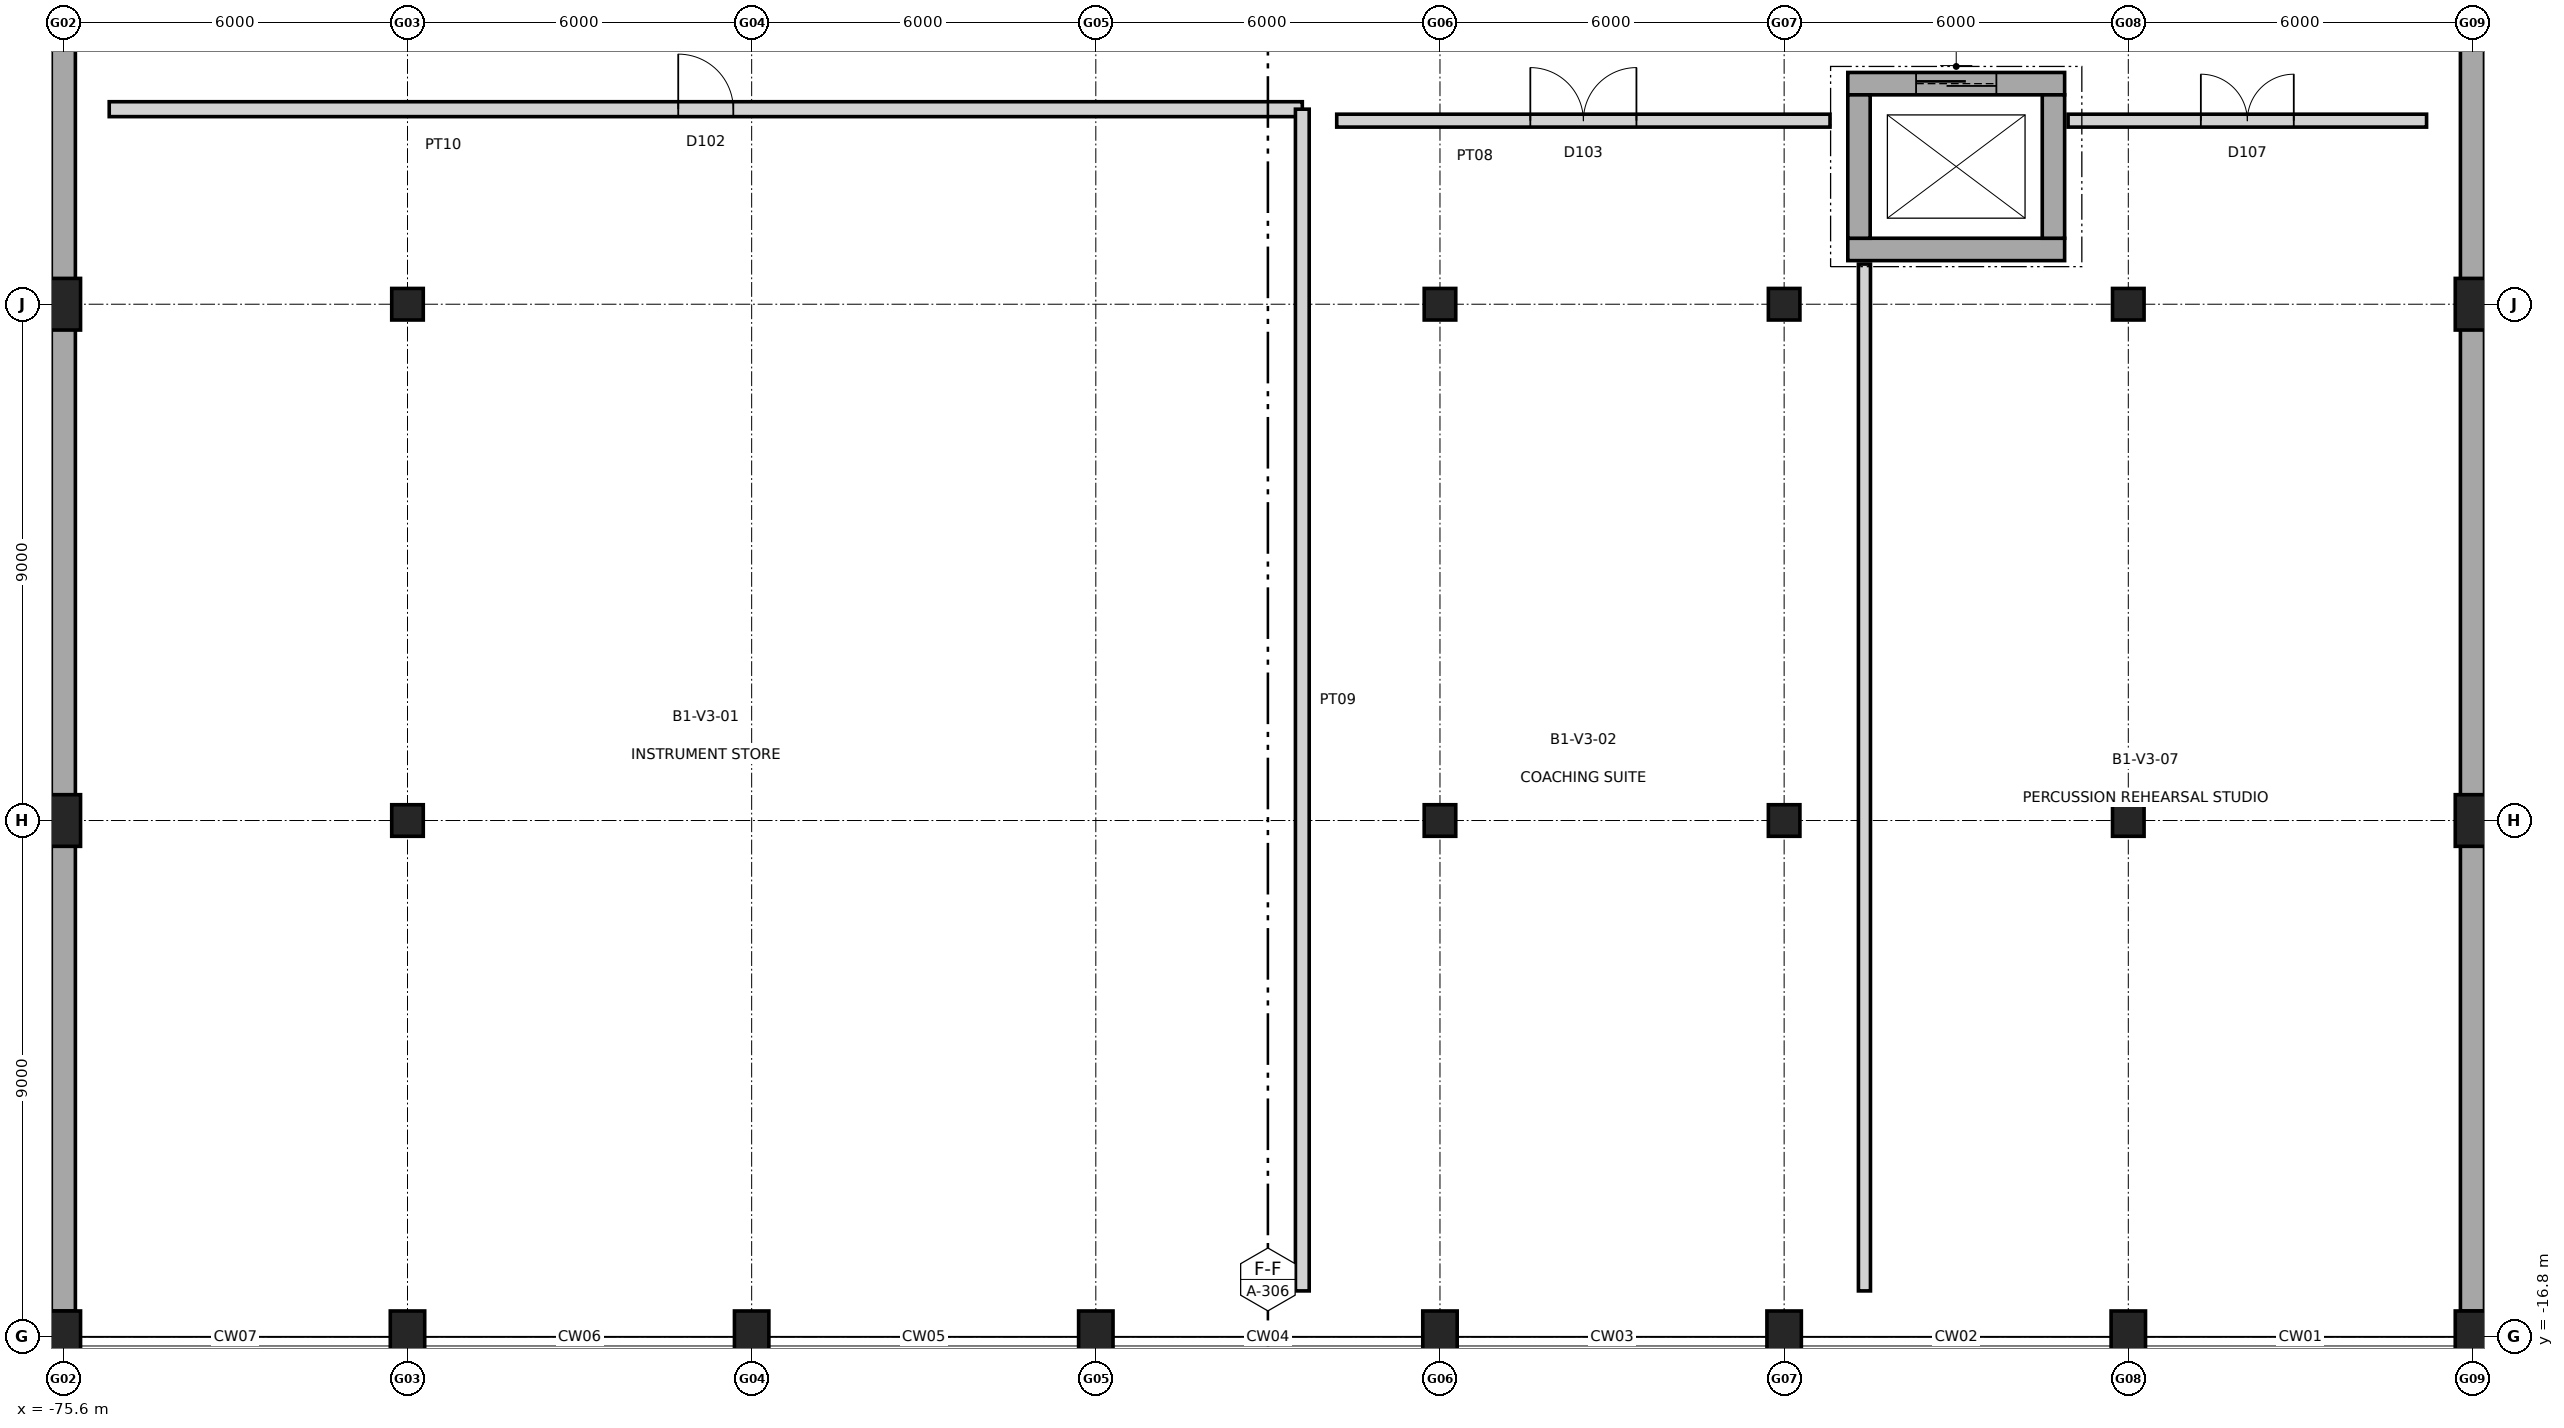
"""IFC4 building model, lengths in metres.
Left out: names, types, materials, properties, quantities, classifications, styles, units other than length and angle.
Written with IfcOpenShell. Run it as: python <this file> out.ifc"""

import sys

from ifc_helpers import new_model, si_unit, direction, frame, frame_2d, origin, origin_2d, place, context, subcontext, project, spatial, rectangle, extrude, element, fill, save


model = new_model("IFC4")
c1 = context("Model", 3, precision=1e-05, world=origin(), true_north=direction((0.0, 1.0)))
c2 = subcontext(c1, "Body", "Model", "MODEL_VIEW")
j1 = project(units=[si_unit("LENGTHUNIT", "METRE"), si_unit("PLANEANGLEUNIT", "RADIAN")], contexts=[c1])
p1 = place(None, origin())
s1 = spatial("IfcSite", under=j1, at=p1, CompositionType="ELEMENT")
p2 = place(p1, origin())
s2 = spatial("IfcBuilding", under=s1, at=p2, CompositionType="ELEMENT")
p3 = place(p2, frame((0.0, 0.0, -5.4)))
s3 = spatial("IfcBuildingStorey", under=s2, at=p3, CompositionType="ELEMENT", Elevation=-5.4)
for number, where, z_axis, x_axis in (
    (1, (-75.6, -16.8, 0.0), (0.0, 0.0, 1.0), (1.0, 0.0, 0.0)),
    (2, (-75.6, -7.8, 0.0), (0.0, 0.0, 1.0), (1.0, 0.0, 0.0)),
    (3, (-75.6, 1.2, 0.0), (0.0, 0.0, 1.0), (1.0, 0.0, 0.0)),
    (4, (-69.6, -16.8, 0.0), (0.0, 0.0, 1.0), (1.0, 0.0, 0.0)),
):
    element("IfcColumn", number, at=place(p3, frame(where, z_axis=z_axis, x_axis=x_axis)), inside=s3, PredefinedType="COLUMN", context=c2, shape_type="SweptSolid", body=[
        extrude(rectangle(XDim=0.6, YDim=0.9, at=origin_2d()), origin(), (0.0, 0.0, 1.0), 5.4),
    ])
for number, where, z_axis, x_axis in (
    (5, (-69.6, -7.8, 0.0), (0.0, 0.0, 1.0), (1.0, 0.0, 0.0)),
    (6, (-69.6, 1.2, 0.0), (0.0, 0.0, 1.0), (1.0, 0.0, 0.0)),
):
    element("IfcColumn", number, at=place(p3, frame(where, z_axis=z_axis, x_axis=x_axis)), inside=s3, PredefinedType="COLUMN", context=c2, shape_type="SweptSolid", body=[
        extrude(rectangle(XDim=0.55, YDim=0.55, at=origin_2d()), origin(), (0.0, 0.0, 1.0), 5.4),
    ])
for number, where, z_axis, x_axis in (
    (7, (-63.6, -16.8, 0.0), (0.0, 0.0, 1.0), (1.0, 0.0, 0.0)),
    (8, (-57.6, -16.8, 0.0), (0.0, 0.0, 1.0), (1.0, 0.0, 0.0)),
    (9, (-51.6, -16.8, 0.0), (0.0, 0.0, 1.0), (1.0, 0.0, 0.0)),
):
    element("IfcColumn", number, at=place(p3, frame(where, z_axis=z_axis, x_axis=x_axis)), inside=s3, PredefinedType="COLUMN", context=c2, shape_type="SweptSolid", body=[
        extrude(rectangle(XDim=0.6, YDim=0.9, at=origin_2d()), origin(), (0.0, 0.0, 1.0), 5.4),
    ])
for number, where, z_axis, x_axis in (
    (10, (-51.6, -7.8, 0.0), (0.0, 0.0, 1.0), (1.0, 0.0, 0.0)),
    (11, (-51.6, 1.2, 0.0), (0.0, 0.0, 1.0), (1.0, 0.0, 0.0)),
):
    element("IfcColumn", number, at=place(p3, frame(where, z_axis=z_axis, x_axis=x_axis)), inside=s3, PredefinedType="COLUMN", context=c2, shape_type="SweptSolid", body=[
        extrude(rectangle(XDim=0.55, YDim=0.55, at=origin_2d()), origin(), (0.0, 0.0, 1.0), 5.4),
    ])
p4 = place(p3, frame((-45.6, -16.8, 0.0), z_axis=(0.0, 0.0, 1.0), x_axis=(1.0, 0.0, 0.0)))
e12 = element("IfcColumn", 12, at=p4, inside=s3, PredefinedType="COLUMN", context=c2, shape_type="SweptSolid", body=[
    extrude(rectangle(XDim=0.6, YDim=0.9, at=origin_2d()), origin(), (0.0, 0.0, 1.0), 5.4),
])
for number, where, z_axis, x_axis in (
    (13, (-45.6, -7.8, 0.0), (0.0, 0.0, 1.0), (1.0, 0.0, 0.0)),
    (14, (-45.6, 1.2, 0.0), (0.0, 0.0, 1.0), (1.0, 0.0, 0.0)),
):
    element("IfcColumn", number, at=place(p3, frame(where, z_axis=z_axis, x_axis=x_axis)), inside=s3, PredefinedType="COLUMN", context=c2, shape_type="SweptSolid", body=[
        extrude(rectangle(XDim=0.55, YDim=0.55, at=origin_2d()), origin(), (0.0, 0.0, 1.0), 5.4),
    ])
p5 = place(p3, frame((-39.6, -16.8, 0.0), z_axis=(0.0, 0.0, 1.0), x_axis=(1.0, 0.0, 0.0)))
e15 = element("IfcColumn", 15, at=p5, inside=s3, PredefinedType="COLUMN", context=c2, shape_type="SweptSolid", body=[
    extrude(rectangle(XDim=0.6, YDim=0.9, at=origin_2d()), origin(), (0.0, 0.0, 1.0), 5.4),
])
for number, where, z_axis, x_axis in (
    (16, (-39.6, -7.8, 0.0), (0.0, 0.0, 1.0), (1.0, 0.0, 0.0)),
    (17, (-39.6, 1.2, 0.0), (0.0, 0.0, 1.0), (1.0, 0.0, 0.0)),
):
    element("IfcColumn", number, at=place(p3, frame(where, z_axis=z_axis, x_axis=x_axis)), inside=s3, PredefinedType="COLUMN", context=c2, shape_type="SweptSolid", body=[
        extrude(rectangle(XDim=0.55, YDim=0.55, at=origin_2d()), origin(), (0.0, 0.0, 1.0), 5.4),
    ])
for number, where, z_axis, x_axis in (
    (18, (-33.6, -16.8, 0.0), (0.0, 0.0, 1.0), (1.0, 0.0, 0.0)),
    (19, (-33.6, -7.8, 0.0), (0.0, 0.0, 1.0), (1.0, 0.0, 0.0)),
    (20, (-33.6, 1.2, 0.0), (0.0, 0.0, 1.0), (1.0, 0.0, 0.0)),
):
    element("IfcColumn", number, at=place(p3, frame(where, z_axis=z_axis, x_axis=x_axis)), inside=s3, PredefinedType="COLUMN", context=c2, shape_type="SweptSolid", body=[
        extrude(rectangle(XDim=0.6, YDim=0.9, at=origin_2d()), origin(), (0.0, 0.0, 1.0), 5.4),
    ])
for number, where, z_axis, x_axis in (
    (21, (-75.6, -16.35, 0.0), (0.0, 0.0, 1.0), (0.0, 1.0, 0.0)),
    (22, (-33.6, -16.35, 0.0), (0.0, 0.0, 1.0), (0.0, 1.0, 0.0)),
):
    element("IfcWall", number, at=place(p3, frame(where, z_axis=z_axis, x_axis=x_axis)), inside=s3, PredefinedType="USERDEFINED", context=c2, shape_type="SweptSolid", body=[
        extrude(rectangle(XDim=57.9, YDim=0.42, at=frame_2d((28.95, 0.0))), origin(), (0.0, 0.0, 1.0), 5.11),
    ])
p6 = place(p3, frame((-40.71, 2.155, 0.0), z_axis=(0.0, 0.0, 1.0), x_axis=(-1.0, 0.0, 0.0)))
e23 = element("IfcWall", 23, at=p6, inside=s3, PredefinedType="SHEAR", context=c2, shape_type="SweptSolid", body=[
    extrude(rectangle(XDim=3.78, YDim=0.39, at=frame_2d((1.89, 0.0))), origin(), (0.0, 0.0, 1.0), 5.4),
])
p7 = place(p3, frame((-44.49, 5.045, 0.0), z_axis=(0.0, 0.0, 1.0), x_axis=(1.0, 0.0, 0.0)))
e24 = element("IfcWall", 24, at=p7, inside=s3, PredefinedType="SHEAR", context=c2, shape_type="SweptSolid", body=[
    extrude(rectangle(XDim=3.78, YDim=0.39, at=frame_2d((1.89, 0.0))), origin(), (0.0, 0.0, 1.0), 5.4),
])
p8 = place(p7, frame((1.19, 0.0, 0.0)))
e25 = element("IfcOpeningElement", 25, at=p8, cuts=e24, PredefinedType="OPENING", context=c2, shape_type="SweptSolid", body=[
    extrude(rectangle(XDim=1.4, YDim=2.2, at=frame_2d((0.7, 1.1))), frame((0.0, 0.205, 0.0), z_axis=(0.0, -1.0, 0.0), x_axis=(1.0, 0.0, 0.0)), (0.0, 0.0, 1.0), 0.41),
])
for number, where, z_axis, x_axis in (
    (26, (-44.295, 2.35, 0.0), (0.0, 0.0, 1.0), (0.0, 1.0, 0.0)),
    (27, (-40.905, 4.85, 0.0), (0.0, 0.0, 1.0), (0.0, -1.0, 0.0)),
):
    element("IfcWall", number, at=place(p3, frame(where, z_axis=z_axis, x_axis=x_axis)), inside=s3, PredefinedType="SHEAR", context=c2, shape_type="SweptSolid", body=[
        extrude(rectangle(XDim=2.5, YDim=0.39, at=frame_2d((1.25, 0.0))), origin(), (0.0, 0.0, 1.0), 5.4),
    ])
p9 = place(p3, frame((-74.8, 4.6, 0.0), z_axis=(0.0, 0.0, 1.0), x_axis=(1.0, 0.0, 0.0)))
e28 = element("IfcWall", 28, at=p9, inside=s3, PredefinedType="PARTITIONING", context=c2, shape_type="SweptSolid", body=[
    extrude(rectangle(XDim=20.8, YDim=0.26, at=frame_2d((10.4, 0.0))), origin(), (0.0, 0.0, 1.0), 5.02),
])
p10 = place(p9, frame((9.92, 0.0, 0.0)))
e29 = element("IfcOpeningElement", 29, at=p10, cuts=e28, PredefinedType="OPENING", context=c2, shape_type="SweptSolid", body=[
    extrude(rectangle(XDim=0.96, YDim=2.2, at=frame_2d((0.48, 1.1))), frame((0.0, 0.14, 0.0), z_axis=(0.0, -1.0, 0.0), x_axis=(1.0, 0.0, 0.0)), (0.0, 0.0, 1.0), 0.28),
])
p11 = place(p3, frame((-54.0, -16.0, 0.0), z_axis=(0.0, 0.0, 1.0), x_axis=(0.0, 1.0, 0.0)))
e30 = element("IfcWall", 30, at=p11, inside=s3, PredefinedType="PARTITIONING", context=c2, shape_type="SweptSolid", body=[
    extrude(rectangle(XDim=20.6, YDim=0.24, at=frame_2d((10.3, 0.0))), origin(), (0.0, 0.0, 1.0), 5.02),
])
p12 = place(p3, frame((-53.4, 4.4, 0.0), z_axis=(0.0, 0.0, 1.0), x_axis=(1.0, 0.0, 0.0)))
e31 = element("IfcWall", 31, at=p12, inside=s3, PredefinedType="PARTITIONING", context=c2, shape_type="SweptSolid", body=[
    extrude(rectangle(XDim=8.6, YDim=0.225, at=frame_2d((4.3, 0.0))), origin(), (0.0, 0.0, 1.0), 5.02),
])
p13 = place(p12, frame((3.375, 0.0, 0.0)))
e32 = element("IfcOpeningElement", 32, at=p13, cuts=e31, PredefinedType="OPENING", context=c2, shape_type="SweptSolid", body=[
    extrude(rectangle(XDim=1.85, YDim=2.3, at=frame_2d((0.925, 1.15))), frame((0.0, 0.123, 0.0), z_axis=(0.0, -1.0, 0.0), x_axis=(1.0, 0.0, 0.0)), (0.0, 0.0, 1.0), 0.245),
])
p14 = place(p3, frame((-40.65, 4.4, 0.0), z_axis=(0.0, 0.0, 1.0), x_axis=(1.0, 0.0, 0.0)))
e33 = element("IfcWall", 33, at=p14, inside=s3, PredefinedType="PARTITIONING", context=c2, shape_type="SweptSolid", body=[
    extrude(rectangle(XDim=6.25, YDim=0.225, at=frame_2d((3.125, 0.0))), origin(), (0.0, 0.0, 1.0), 5.02),
])
p15 = place(p14, frame((2.315, 0.0, 0.0)))
e34 = element("IfcOpeningElement", 34, at=p15, cuts=e33, PredefinedType="OPENING", context=c2, shape_type="SweptSolid", body=[
    extrude(rectangle(XDim=1.62, YDim=2.2, at=frame_2d((0.81, 1.1))), frame((0.0, 0.123, 0.0), z_axis=(0.0, -1.0, 0.0), x_axis=(1.0, 0.0, 0.0)), (0.0, 0.0, 1.0), 0.245),
])
p16 = place(p3, frame((-44.2, -16.0, 0.0), z_axis=(0.0, 0.0, 1.0), x_axis=(0.0, 1.0, 0.0)))
e35 = element("IfcWall", 35, at=p16, inside=s3, PredefinedType="PARTITIONING", context=c2, shape_type="SweptSolid", body=[
    extrude(rectangle(XDim=17.9, YDim=0.21, at=frame_2d((8.95, 0.0))), origin(), (0.0, 0.0, 1.0), 5.02),
])
p17 = place(p8, origin())
e36 = element("IfcDoor", 36, at=p17, inside=s3, OperationType="SLIDING_TO_LEFT", PredefinedType="DOOR", context=c2, shape_type="SweptSolid", body=[
    extrude(rectangle(XDim=1.4, YDim=2.2, at=frame_2d((0.7, 1.1))), frame((0.0, 0.025, 0.0), z_axis=(0.0, -1.0, 0.0), x_axis=(1.0, 0.0, 0.0)), (0.0, 0.0, 1.0), 0.05),
])
fill(e25, e36)
p18 = place(p10, origin())
e37 = element("IfcDoor", 37, at=p18, inside=s3, OperationType="SINGLE_SWING_LEFT", PredefinedType="DOOR", context=c2, shape_type="SweptSolid", body=[
    extrude(rectangle(XDim=0.96, YDim=2.2, at=frame_2d((0.48, 1.1))), frame((0.0, 0.025, 0.0), z_axis=(0.0, -1.0, 0.0), x_axis=(1.0, 0.0, 0.0)), (0.0, 0.0, 1.0), 0.05),
])
fill(e29, e37)
p19 = place(p13, origin())
e38 = element("IfcDoor", 38, at=p19, inside=s3, OperationType="DOUBLE_DOOR_SINGLE_SWING", PredefinedType="DOOR", context=c2, shape_type="SweptSolid", body=[
    extrude(rectangle(XDim=1.85, YDim=2.3, at=frame_2d((0.925, 1.15))), frame((0.0, 0.025, 0.0), z_axis=(0.0, -1.0, 0.0), x_axis=(1.0, 0.0, 0.0)), (0.0, 0.0, 1.0), 0.05),
])
fill(e32, e38)
p20 = place(p15, origin())
e39 = element("IfcDoor", 39, at=p20, inside=s3, OperationType="DOUBLE_DOOR_SINGLE_SWING", PredefinedType="DOOR", context=c2, shape_type="SweptSolid", body=[
    extrude(rectangle(XDim=1.62, YDim=2.2, at=frame_2d((0.81, 1.1))), frame((0.0, 0.025, 0.0), z_axis=(0.0, -1.0, 0.0), x_axis=(1.0, 0.0, 0.0)), (0.0, 0.0, 1.0), 0.05),
])
fill(e34, e39)
save(model, sys.argv[1])
